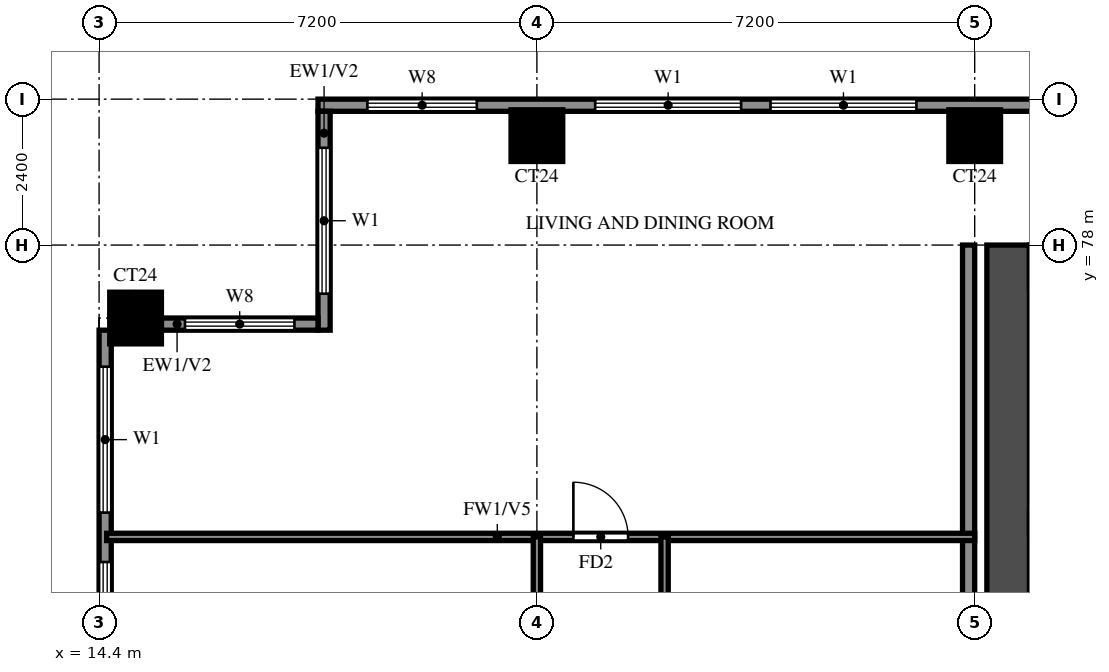
"""IFC4 building model, lengths in metres.
Left out: names, types, materials, properties, quantities, classifications, styles, units other than length and angle.
Written with IfcOpenShell. Run it as: python <this file> out.ifc"""

import sys

from ifc_helpers import new_model, si_unit, direction, frame, frame_2d, origin, origin_2d, place, context, subcontext, project, spatial, rectangle, extrude, source, transform, mapped, element, fill, save


model = new_model("IFC4")
c1 = context("Model", 3, precision=1e-05, world=origin(), true_north=direction((0.0, 1.0)))
c2 = subcontext(c1, "Body", "Model", "MODEL_VIEW")
j1 = project(units=[si_unit("LENGTHUNIT", "METRE"), si_unit("PLANEANGLEUNIT", "RADIAN")], contexts=[c1])
p1 = place(None, origin())
s1 = spatial("IfcSite", under=j1, at=p1, CompositionType="ELEMENT")
p2 = place(p1, origin())
s2 = spatial("IfcBuilding", under=s1, at=p2, CompositionType="ELEMENT")
p3 = place(p2, frame((0.0, 0.0, 164.0)))
s3 = spatial("IfcBuildingStorey", under=s2, at=p3, CompositionType="ELEMENT", Elevation=164.0)
m1 = source(origin(), c2, "Body", "SweptSolid", [
    extrude(rectangle(XDim=0.85, YDim=0.85, at=origin_2d()), origin(), (0.0, 0.0, 1.0), 3.2),
])
for number, where, z_axis, x_axis in (
    (1, (15.0, 76.8, 0.0), (0.0, 0.0, 1.0), (1.0, 0.0, 0.0)),
    (2, (21.6, 79.8, 0.0), (0.0, 0.0, 1.0), (1.0, 0.0, 0.0)),
    (3, (28.8, 79.8, 0.0), (0.0, 0.0, 1.0), (1.0, 0.0, 0.0)),
):
    element("IfcColumn", number, at=place(p3, frame(where, z_axis=z_axis, x_axis=x_axis)), inside=s3, PredefinedType="COLUMN", context=c2, shape_type="MappedRepresentation", body=[
        mapped(m1, transform((0.0, 0.0, 0.0))),
    ])
p4 = place(p3, frame((29.35, 66.1, 0.0), z_axis=(0.0, 0.0, 1.0), x_axis=(0.0, 1.0, 0.0)))
e4 = element("IfcWall", 4, at=p4, inside=s3, PredefinedType="SHEAR", context=c2, shape_type="SweptSolid", body=[
    extrude(rectangle(XDim=11.9, YDim=0.7, at=frame_2d((5.95, 0.0))), origin(), (0.0, 0.0, 1.0), 3.2),
])
p5 = place(p3, frame((82.6, 80.3, 0.0), z_axis=(0.0, 0.0, 1.0), x_axis=(-1.0, 0.0, 0.0)))
e5 = element("IfcWall", 5, at=p5, inside=s3, PredefinedType="SOLIDWALL", context=c2, shape_type="SweptSolid", body=[
    extrude(rectangle(XDim=64.6, YDim=0.2, at=frame_2d((32.3, 0.0))), origin(), (0.0, 0.0, 1.0), 3.2),
])
p6 = place(p5, frame((7.9, 0.0, 0.0)))
e6 = element("IfcOpeningElement", 6, at=p6, cuts=e5, PredefinedType="OPENING", context=c2, shape_type="SweptSolid", body=[
    extrude(rectangle(XDim=1.8, YDim=2.4, at=frame_2d((0.9, 1.2))), frame((0.0, 0.11, 0.0), z_axis=(0.0, -1.0, 0.0), x_axis=(1.0, 0.0, 0.0)), (0.0, 0.0, 1.0), 0.22),
])
p7 = place(p5, frame((54.758, 0.0, 0.6)))
e7 = element("IfcOpeningElement", 7, at=p7, cuts=e5, PredefinedType="OPENING", context=c2, shape_type="SweptSolid", body=[
    extrude(rectangle(XDim=2.4, YDim=2.4, at=frame_2d((1.2, 1.2))), frame((0.0, 0.11, 0.0), z_axis=(0.0, -1.0, 0.0), x_axis=(1.0, 0.0, 0.0)), (0.0, 0.0, 1.0), 0.22),
])
p8 = place(p5, frame((57.642, 0.0, 0.6)))
e8 = element("IfcOpeningElement", 8, at=p8, cuts=e5, PredefinedType="OPENING", context=c2, shape_type="SweptSolid", body=[
    extrude(rectangle(XDim=2.4, YDim=2.4, at=frame_2d((1.2, 1.2))), frame((0.0, 0.11, 0.0), z_axis=(0.0, -1.0, 0.0), x_axis=(1.0, 0.0, 0.0)), (0.0, 0.0, 1.0), 0.22),
])
p9 = place(p5, frame((61.988, 0.0, 0.6)))
e9 = element("IfcOpeningElement", 9, at=p9, cuts=e5, PredefinedType="OPENING", context=c2, shape_type="SweptSolid", body=[
    extrude(rectangle(XDim=1.8, YDim=2.4, at=frame_2d((0.9, 1.2))), frame((0.0, 0.11, 0.0), z_axis=(0.0, -1.0, 0.0), x_axis=(1.0, 0.0, 0.0)), (0.0, 0.0, 1.0), 0.22),
])
p10 = place(p5, frame((0.712, 0.0, 0.6)))
e10 = element("IfcOpeningElement", 10, at=p10, cuts=e5, PredefinedType="OPENING", context=c2, shape_type="SweptSolid", body=[
    extrude(rectangle(XDim=1.8, YDim=2.4, at=frame_2d((0.9, 1.2))), frame((0.0, 0.11, 0.0), z_axis=(0.0, -1.0, 0.0), x_axis=(1.0, 0.0, 0.0)), (0.0, 0.0, 1.0), 0.22),
])
p11 = place(p5, frame((3.887, 0.0, 0.6)))
e11 = element("IfcOpeningElement", 11, at=p11, cuts=e5, PredefinedType="OPENING", context=c2, shape_type="SweptSolid", body=[
    extrude(rectangle(XDim=1.8, YDim=2.4, at=frame_2d((0.9, 1.2))), frame((0.0, 0.11, 0.0), z_axis=(0.0, -1.0, 0.0), x_axis=(1.0, 0.0, 0.0)), (0.0, 0.0, 1.0), 0.22),
])
p12 = place(p5, frame((6.55, 0.0, 0.6)))
e12 = element("IfcOpeningElement", 12, at=p12, cuts=e5, PredefinedType="OPENING", context=c2, shape_type="SweptSolid", body=[
    extrude(rectangle(XDim=0.9, YDim=2.4, at=frame_2d((0.45, 1.2))), frame((0.0, 0.11, 0.0), z_axis=(0.0, -1.0, 0.0), x_axis=(1.0, 0.0, 0.0)), (0.0, 0.0, 1.0), 0.22),
])
p13 = place(p3, frame((18.1, 80.2, 0.0), z_axis=(0.0, 0.0, 1.0), x_axis=(0.0, -1.0, 0.0)))
e13 = element("IfcWall", 13, at=p13, inside=s3, PredefinedType="SOLIDWALL", context=c2, shape_type="SweptSolid", body=[
    extrude(rectangle(XDim=3.6, YDim=0.2, at=frame_2d((1.8, 0.0))), origin(), (0.0, 0.0, 1.0), 3.2),
])
p14 = place(p13, frame((0.6, 0.0, 0.6)))
e14 = element("IfcOpeningElement", 14, at=p14, cuts=e13, PredefinedType="OPENING", context=c2, shape_type="SweptSolid", body=[
    extrude(rectangle(XDim=2.4, YDim=2.4, at=frame_2d((1.2, 1.2))), frame((0.0, 0.11, 0.0), z_axis=(0.0, -1.0, 0.0), x_axis=(1.0, 0.0, 0.0)), (0.0, 0.0, 1.0), 0.22),
])
p15 = place(p3, frame((18.0, 76.7, 0.0), z_axis=(0.0, 0.0, 1.0), x_axis=(-1.0, 0.0, 0.0)))
e15 = element("IfcWall", 15, at=p15, inside=s3, PredefinedType="SOLIDWALL", context=c2, shape_type="SweptSolid", body=[
    extrude(rectangle(XDim=2.575, YDim=0.2, at=frame_2d((1.288, 0.0))), origin(), (0.0, 0.0, 1.0), 3.2),
])
p16 = place(p15, frame((0.387, 0.0, 0.6)))
e16 = element("IfcOpeningElement", 16, at=p16, cuts=e15, PredefinedType="OPENING", context=c2, shape_type="SweptSolid", body=[
    extrude(rectangle(XDim=1.8, YDim=2.4, at=frame_2d((0.9, 1.2))), frame((0.0, 0.11, 0.0), z_axis=(0.0, -1.0, 0.0), x_axis=(1.0, 0.0, 0.0)), (0.0, 0.0, 1.0), 0.22),
])
p17 = place(p3, frame((14.5, 76.6, 0.0), z_axis=(0.0, 0.0, 1.0), x_axis=(0.0, -1.0, 0.0)))
e17 = element("IfcWall", 17, at=p17, inside=s3, PredefinedType="SOLIDWALL", context=c2, shape_type="SweptSolid", body=[
    extrude(rectangle(XDim=14.2, YDim=0.2, at=frame_2d((7.1, 0.0))), origin(), (0.0, 0.0, 1.0), 3.2),
])
p18 = place(p17, frame((11.012, 0.0, 0.6)))
e18 = element("IfcOpeningElement", 18, at=p18, cuts=e17, PredefinedType="OPENING", context=c2, shape_type="SweptSolid", body=[
    extrude(rectangle(XDim=2.4, YDim=2.4, at=frame_2d((1.2, 1.2))), frame((0.0, 0.11, 0.0), z_axis=(0.0, -1.0, 0.0), x_axis=(1.0, 0.0, 0.0)), (0.0, 0.0, 1.0), 0.22),
])
p19 = place(p17, frame((8.538, 0.0, 1.5)))
e19 = element("IfcOpeningElement", 19, at=p19, cuts=e17, PredefinedType="OPENING", context=c2, shape_type="SweptSolid", body=[
    extrude(rectangle(XDim=0.9, YDim=0.9, at=frame_2d((0.45, 0.45))), frame((0.0, 0.11, 0.0), z_axis=(0.0, -1.0, 0.0), x_axis=(1.0, 0.0, 0.0)), (0.0, 0.0, 1.0), 0.22),
])
p20 = place(p17, frame((3.812, 0.0, 0.6)))
e20 = element("IfcOpeningElement", 20, at=p20, cuts=e17, PredefinedType="OPENING", context=c2, shape_type="SweptSolid", body=[
    extrude(rectangle(XDim=2.4, YDim=2.4, at=frame_2d((1.2, 1.2))), frame((0.0, 0.11, 0.0), z_axis=(0.0, -1.0, 0.0), x_axis=(1.0, 0.0, 0.0)), (0.0, 0.0, 1.0), 0.22),
])
p21 = place(p17, frame((0.6, 0.0, 0.6)))
e21 = element("IfcOpeningElement", 21, at=p21, cuts=e17, PredefinedType="OPENING", context=c2, shape_type="SweptSolid", body=[
    extrude(rectangle(XDim=2.4, YDim=2.4, at=frame_2d((1.2, 1.2))), frame((0.0, 0.11, 0.0), z_axis=(0.0, -1.0, 0.0), x_axis=(1.0, 0.0, 0.0)), (0.0, 0.0, 1.0), 0.22),
])
p22 = place(p3, frame((28.7, 62.4, 0.0), z_axis=(0.0, 0.0, 1.0), x_axis=(0.0, 1.0, 0.0)))
e22 = element("IfcWall", 22, at=p22, inside=s3, PredefinedType="SOLIDWALL", context=c2, shape_type="SweptSolid", body=[
    extrude(rectangle(XDim=15.6, YDim=0.2, at=frame_2d((7.8, 0.0))), origin(), (0.0, 0.0, 1.0), 3.2),
])
p23 = place(p3, frame((14.525, 73.2, 0.0), z_axis=(0.0, 0.0, 1.0), x_axis=(1.0, 0.0, 0.0)))
e23 = element("IfcWall", 23, at=p23, inside=s3, PredefinedType="PARTITIONING", context=c2, shape_type="SweptSolid", body=[
    extrude(rectangle(XDim=14.275, YDim=0.12, at=frame_2d((7.138, 0.0))), origin(), (0.0, 0.0, 1.0), 2.3),
])
p24 = place(p23, frame((7.675, 0.0, 0.0)))
e24 = element("IfcOpeningElement", 24, at=p24, cuts=e23, PredefinedType="OPENING", context=c2, shape_type="SweptSolid", body=[
    extrude(rectangle(XDim=0.9, YDim=2.1, at=frame_2d((0.45, 1.05))), frame((0.0, 0.07, 0.0), z_axis=(0.0, -1.0, 0.0), x_axis=(1.0, 0.0, 0.0)), (0.0, 0.0, 1.0), 0.14),
])
p25 = place(p3, frame((21.6, 69.6, 0.0), z_axis=(0.0, 0.0, 1.0), x_axis=(0.0, 1.0, 0.0)))
e25 = element("IfcWall", 25, at=p25, inside=s3, PredefinedType="PARTITIONING", context=c2, shape_type="SweptSolid", body=[
    extrude(rectangle(XDim=3.6, YDim=0.12, at=frame_2d((1.8, 0.0))), origin(), (0.0, 0.0, 1.0), 3.2),
])
p26 = place(p25, frame((1.35, 0.0, 0.0)))
e26 = element("IfcOpeningElement", 26, at=p26, cuts=e25, PredefinedType="OPENING", context=c2, shape_type="SweptSolid", body=[
    extrude(rectangle(XDim=0.9, YDim=2.1, at=frame_2d((0.45, 1.05))), frame((0.0, 0.07, 0.0), z_axis=(0.0, -1.0, 0.0), x_axis=(1.0, 0.0, 0.0)), (0.0, 0.0, 1.0), 0.14),
])
p27 = place(p3, frame((23.7, 64.8, 0.0), z_axis=(0.0, 0.0, 1.0), x_axis=(0.0, 1.0, 0.0)))
e27 = element("IfcWall", 27, at=p27, inside=s3, PredefinedType="PARTITIONING", context=c2, shape_type="SweptSolid", body=[
    extrude(rectangle(XDim=8.4, YDim=0.12, at=frame_2d((4.2, 0.0))), origin(), (0.0, 0.0, 1.0), 3.2),
])
p28 = place(p27, frame((6.125, 0.0, 0.0)))
e28 = element("IfcOpeningElement", 28, at=p28, cuts=e27, PredefinedType="OPENING", context=c2, shape_type="SweptSolid", body=[
    extrude(rectangle(XDim=0.8, YDim=2.1, at=frame_2d((0.4, 1.05))), frame((0.0, 0.07, 0.0), z_axis=(0.0, -1.0, 0.0), x_axis=(1.0, 0.0, 0.0)), (0.0, 0.0, 1.0), 0.14),
])
p29 = place(p7, origin())
e29 = element("IfcWindow", 29, at=p29, inside=s3, PartitioningType="DOUBLE_PANEL_VERTICAL", PredefinedType="WINDOW", context=c2, shape_type="SweptSolid", body=[
    extrude(rectangle(XDim=2.4, YDim=2.4, at=frame_2d((1.2, 1.2))), frame((0.0, 0.03, 0.0), z_axis=(0.0, -1.0, 0.0), x_axis=(1.0, 0.0, 0.0)), (0.0, 0.0, 1.0), 0.06),
])
fill(e7, e29)
p30 = place(p8, origin())
e30 = element("IfcWindow", 30, at=p30, inside=s3, PartitioningType="DOUBLE_PANEL_VERTICAL", PredefinedType="WINDOW", context=c2, shape_type="SweptSolid", body=[
    extrude(rectangle(XDim=2.4, YDim=2.4, at=frame_2d((1.2, 1.2))), frame((0.0, 0.03, 0.0), z_axis=(0.0, -1.0, 0.0), x_axis=(1.0, 0.0, 0.0)), (0.0, 0.0, 1.0), 0.06),
])
fill(e8, e30)
p31 = place(p9, origin())
e31 = element("IfcWindow", 31, at=p31, inside=s3, PartitioningType="DOUBLE_PANEL_VERTICAL", PredefinedType="WINDOW", context=c2, shape_type="SweptSolid", body=[
    extrude(rectangle(XDim=1.8, YDim=2.4, at=frame_2d((0.9, 1.2))), frame((0.0, 0.03, 0.0), z_axis=(0.0, -1.0, 0.0), x_axis=(1.0, 0.0, 0.0)), (0.0, 0.0, 1.0), 0.06),
])
fill(e9, e31)
p32 = place(p14, origin())
e32 = element("IfcWindow", 32, at=p32, inside=s3, PartitioningType="DOUBLE_PANEL_VERTICAL", PredefinedType="WINDOW", context=c2, shape_type="SweptSolid", body=[
    extrude(rectangle(XDim=2.4, YDim=2.4, at=frame_2d((1.2, 1.2))), frame((0.0, 0.03, 0.0), z_axis=(0.0, -1.0, 0.0), x_axis=(1.0, 0.0, 0.0)), (0.0, 0.0, 1.0), 0.06),
])
fill(e14, e32)
p33 = place(p16, origin())
e33 = element("IfcWindow", 33, at=p33, inside=s3, PartitioningType="DOUBLE_PANEL_VERTICAL", PredefinedType="WINDOW", context=c2, shape_type="SweptSolid", body=[
    extrude(rectangle(XDim=1.8, YDim=2.4, at=frame_2d((0.9, 1.2))), frame((0.0, 0.03, 0.0), z_axis=(0.0, -1.0, 0.0), x_axis=(1.0, 0.0, 0.0)), (0.0, 0.0, 1.0), 0.06),
])
fill(e16, e33)
p34 = place(p20, origin())
e34 = element("IfcWindow", 34, at=p34, inside=s3, PartitioningType="DOUBLE_PANEL_VERTICAL", PredefinedType="WINDOW", context=c2, shape_type="SweptSolid", body=[
    extrude(rectangle(XDim=2.4, YDim=2.4, at=frame_2d((1.2, 1.2))), frame((0.0, 0.03, 0.0), z_axis=(0.0, -1.0, 0.0), x_axis=(1.0, 0.0, 0.0)), (0.0, 0.0, 1.0), 0.06),
])
fill(e20, e34)
p35 = place(p21, origin())
e35 = element("IfcWindow", 35, at=p35, inside=s3, PartitioningType="DOUBLE_PANEL_VERTICAL", PredefinedType="WINDOW", context=c2, shape_type="SweptSolid", body=[
    extrude(rectangle(XDim=2.4, YDim=2.4, at=frame_2d((1.2, 1.2))), frame((0.0, 0.03, 0.0), z_axis=(0.0, -1.0, 0.0), x_axis=(1.0, 0.0, 0.0)), (0.0, 0.0, 1.0), 0.06),
])
fill(e21, e35)
p36 = place(p24, origin())
e36 = element("IfcDoor", 36, at=p36, inside=s3, OperationType="SINGLE_SWING_RIGHT", PredefinedType="DOOR", context=c2, shape_type="SweptSolid", body=[
    extrude(rectangle(XDim=0.9, YDim=2.1, at=frame_2d((0.45, 1.05))), frame((0.0, 0.025, 0.0), z_axis=(0.0, -1.0, 0.0), x_axis=(1.0, 0.0, 0.0)), (0.0, 0.0, 1.0), 0.05),
])
fill(e24, e36)
save(model, sys.argv[1])
